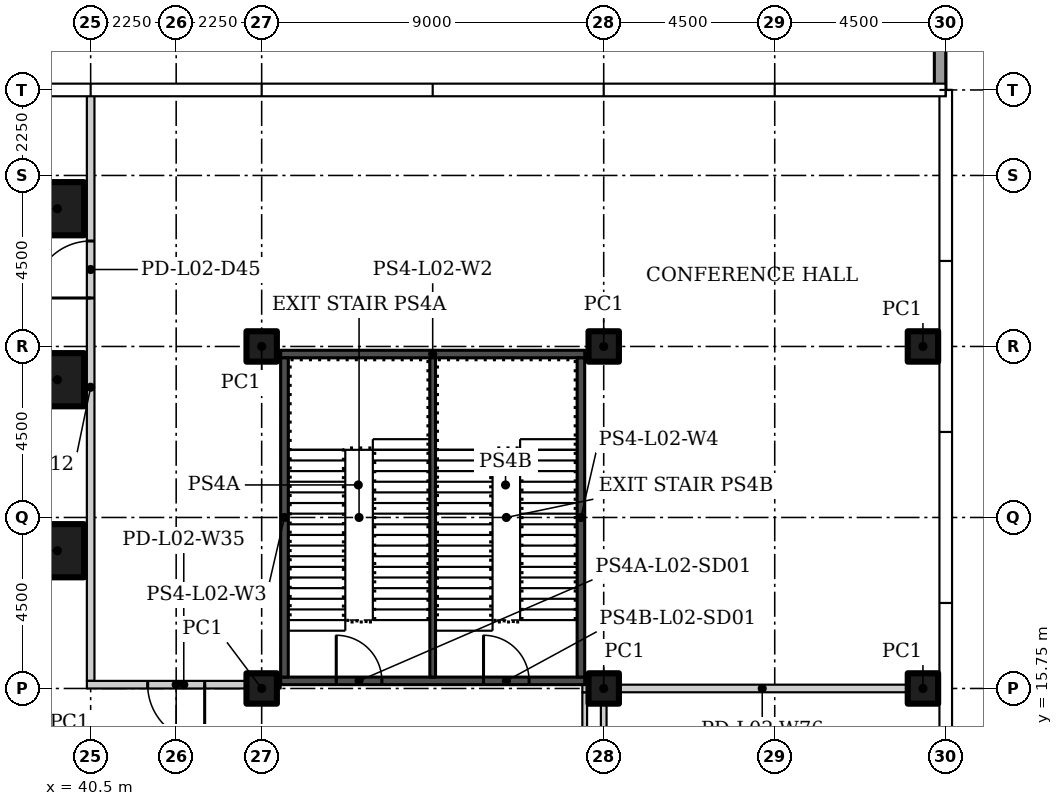
"""IFC4 building model, lengths in metres.
Left out: names, types, materials, properties, quantities, classifications, styles, units other than length and angle.
Written with IfcOpenShell. Run it as: python <this file> out.ifc"""

import sys

from ifc_helpers import new_model, si_unit, direction, frame, frame_2d, origin, origin_2d, place, context, subcontext, project, spatial, rectangle, hollow_rectangle, extrude, element, fill, save


model = new_model("IFC4")
c1 = context("Model", 3, precision=1e-05, world=origin(), true_north=direction((0.0, 1.0)))
c2 = subcontext(c1, "Body", "Model", "MODEL_VIEW")
j1 = project(units=[si_unit("LENGTHUNIT", "METRE"), si_unit("PLANEANGLEUNIT", "RADIAN")], contexts=[c1])
p1 = place(None, origin())
s1 = spatial("IfcSite", under=j1, at=p1, CompositionType="ELEMENT")
p2 = place(p1, origin())
s2 = spatial("IfcBuilding", under=s1, at=p2, CompositionType="ELEMENT")
p3 = place(p2, frame((0.0, 0.0, 12.5)))
s3 = spatial("IfcBuildingStorey", under=s2, at=p3, CompositionType="ELEMENT", Elevation=12.5)
for number, where in (
    (1, (39.625, 19.375, 0.0)),
    (2, (39.625, 23.875, 0.0)),
    (3, (39.625, 28.375, 0.0)),
):
    element("IfcColumn", number, at=place(p3, frame(where)), inside=s3, PredefinedType="COLUMN", context=c2, shape_type="SweptSolid", body=[
        extrude(hollow_rectangle(XDim=1.4, YDim=1.4, WallThickness=0.06, at=origin_2d()), origin(), (0.0, 0.0, 1.0), 5.6),
    ])
for number, where in (
    (4, (45.0, 15.75, 0.0)),
    (5, (45.0, 24.75, 0.0)),
    (6, (54.0, 15.75, 0.0)),
    (7, (54.0, 24.75, 0.0)),
    (8, (62.4, 15.75, 0.0)),
    (9, (62.4, 24.75, 0.0)),
):
    element("IfcColumn", number, at=place(p3, frame(where)), inside=s3, PredefinedType="COLUMN", context=c2, shape_type="SweptSolid", body=[
        extrude(hollow_rectangle(XDim=0.8, YDim=0.8, WallThickness=0.03, at=origin_2d()), origin(), (0.0, 0.0, 1.0), 5.6),
    ])
p4 = place(p3, frame((40.5, 15.95, 0.0), z_axis=(0.0, 0.0, 1.0), x_axis=(0.0, 1.0, 0.0)))
e10 = element("IfcWall", 10, at=p4, inside=s3, PredefinedType="PARTITIONING", context=c2, shape_type="SweptSolid", body=[
    extrude(rectangle(XDim=15.455, YDim=0.2, at=frame_2d((7.728, 0.0))), origin(), (0.0, 0.0, 1.0), 5.6),
])
p5 = place(p4, frame((10.075, 0.0, 0.0)))
e11 = element("IfcOpeningElement", 11, at=p5, cuts=e10, PredefinedType="OPENING", context=c2, shape_type="SweptSolid", body=[
    extrude(rectangle(XDim=1.5, YDim=2.1, at=frame_2d((0.75, 1.05))), frame((0.0, 0.11, 0.0), z_axis=(0.0, -1.0, 0.0), x_axis=(1.0, 0.0, 0.0)), (0.0, 0.0, 1.0), 0.22),
])
p6 = place(p3, frame((45.5, 15.85, 0.0), z_axis=(0.0, 0.0, 1.0), x_axis=(-1.0, 0.0, 0.0)))
e12 = element("IfcWall", 12, at=p6, inside=s3, PredefinedType="PARTITIONING", context=c2, shape_type="SweptSolid", body=[
    extrude(rectangle(XDim=5.1, YDim=0.2, at=frame_2d((2.55, 0.0))), origin(), (0.0, 0.0, 1.0), 5.6),
])
p7 = place(p6, frame((2.0, 0.0, 0.0)))
e13 = element("IfcOpeningElement", 13, at=p7, cuts=e12, PredefinedType="OPENING", context=c2, shape_type="SweptSolid", body=[
    extrude(rectangle(XDim=1.5, YDim=2.1, at=frame_2d((0.75, 1.05))), frame((0.0, 0.11, 0.0), z_axis=(0.0, -1.0, 0.0), x_axis=(1.0, 0.0, 0.0)), (0.0, 0.0, 1.0), 0.22),
])
p8 = place(p3, frame((53.5, 15.65, 0.0), z_axis=(0.0, 0.0, 1.0), x_axis=(0.0, -1.0, 0.0)))
e14 = element("IfcWall", 14, at=p8, inside=s3, PredefinedType="PARTITIONING", context=c2, shape_type="SweptSolid", body=[
    extrude(rectangle(XDim=2.738, YDim=0.125, at=frame_2d((1.369, 0.0))), origin(), (0.0, 0.0, 1.0), 5.6),
])
p9 = place(p3, frame((53.438, 15.75, 0.0)))
e15 = element("IfcWall", 15, at=p9, inside=s3, PredefinedType="PARTITIONING", context=c2, shape_type="SweptSolid", body=[
    extrude(rectangle(XDim=9.468, YDim=0.2, at=frame_2d((4.734, 0.0))), origin(), (0.0, 0.0, 1.0), 5.6),
])
p10 = place(p3, frame((54.0, 15.65, 0.0), z_axis=(0.0, 0.0, 1.0), x_axis=(0.0, -1.0, 0.0)))
e16 = element("IfcWall", 16, at=p10, inside=s3, PredefinedType="PARTITIONING", context=c2, shape_type="SweptSolid", body=[
    extrude(rectangle(XDim=8.825, YDim=0.15, at=frame_2d((4.413, 0.0))), origin(), (0.0, 0.0, 1.0), 5.6),
])
p11 = place(p3, frame((62.85, 31.5, 0.0), z_axis=(0.0, 0.0, 1.0), x_axis=(0.0, 1.0, 0.0)))
e17 = element("IfcWall", 17, at=p11, inside=s3, PredefinedType="PARAPET", context=c2, shape_type="SweptSolid", body=[
    extrude(rectangle(XDim=2.25, YDim=0.3, at=frame_2d((1.125, 0.0))), origin(), (0.0, 0.0, 1.0), 1.1),
])
p12 = place(p3, frame((45.5, 15.95, 0.0)))
e18 = element("IfcWall", 18, at=p12, inside=s3, PredefinedType="SHEAR", context=c2, shape_type="SweptSolid", body=[
    extrude(rectangle(XDim=8.0, YDim=0.2, at=frame_2d((4.0, 0.0))), origin(), (0.0, 0.0, 1.0), 5.6),
])
p13 = place(p12, frame((1.462, 0.0, 0.0)))
e19 = element("IfcOpeningElement", 19, at=p13, cuts=e18, PredefinedType="OPENING", context=c2, shape_type="SweptSolid", body=[
    extrude(rectangle(XDim=1.2, YDim=2.4, at=frame_2d((0.6, 1.2))), frame((0.0, 0.11, 0.0), z_axis=(0.0, -1.0, 0.0), x_axis=(1.0, 0.0, 0.0)), (0.0, 0.0, 1.0), 0.22),
])
p14 = place(p12, frame((5.337, 0.0, 0.0)))
e20 = element("IfcOpeningElement", 20, at=p14, cuts=e18, PredefinedType="OPENING", context=c2, shape_type="SweptSolid", body=[
    extrude(rectangle(XDim=1.2, YDim=2.4, at=frame_2d((0.6, 1.2))), frame((0.0, 0.11, 0.0), z_axis=(0.0, -1.0, 0.0), x_axis=(1.0, 0.0, 0.0)), (0.0, 0.0, 1.0), 0.22),
])
p15 = place(p3, frame((45.5, 24.55, 0.0)))
e21 = element("IfcWall", 21, at=p15, inside=s3, PredefinedType="SHEAR", context=c2, shape_type="SweptSolid", body=[
    extrude(rectangle(XDim=8.0, YDim=0.2, at=frame_2d((4.0, 0.0))), origin(), (0.0, 0.0, 1.0), 5.6),
])
for number, where, z_axis, x_axis in (
    (22, (45.6, 16.05, 0.0), (0.0, 0.0, 1.0), (0.0, 1.0, 0.0)),
    (23, (53.4, 16.05, 0.0), (0.0, 0.0, 1.0), (0.0, 1.0, 0.0)),
):
    element("IfcWall", number, at=place(p3, frame(where, z_axis=z_axis, x_axis=x_axis)), inside=s3, PredefinedType="SHEAR", context=c2, shape_type="SweptSolid", body=[
        extrude(rectangle(XDim=8.4, YDim=0.2, at=frame_2d((4.2, 0.0))), origin(), (0.0, 0.0, 1.0), 5.6),
    ])
p16 = place(p3, frame((49.5, 16.05, 0.0), z_axis=(0.0, 0.0, 1.0), x_axis=(0.0, 1.0, 0.0)))
e24 = element("IfcWall", 24, at=p16, inside=s3, PredefinedType="SHEAR", context=c2, shape_type="SweptSolid", body=[
    extrude(rectangle(XDim=8.4, YDim=0.15, at=frame_2d((4.2, 0.0))), origin(), (0.0, 0.0, 1.0), 5.6),
])
p17 = place(p5, origin())
e25 = element("IfcDoor", 25, at=p17, inside=s3, OperationType="DOUBLE_DOOR_SINGLE_SWING", PredefinedType="DOOR", context=c2, shape_type="SweptSolid", body=[
    extrude(rectangle(XDim=1.5, YDim=2.1, at=frame_2d((0.75, 1.05))), frame((0.0, 0.025, 0.0), z_axis=(0.0, -1.0, 0.0), x_axis=(1.0, 0.0, 0.0)), (0.0, 0.0, 1.0), 0.05),
])
fill(e11, e25)
p18 = place(p7, origin())
e26 = element("IfcDoor", 26, at=p18, inside=s3, OperationType="DOUBLE_DOOR_SINGLE_SWING", PredefinedType="DOOR", context=c2, shape_type="SweptSolid", body=[
    extrude(rectangle(XDim=1.5, YDim=2.1, at=frame_2d((0.75, 1.05))), frame((0.0, 0.025, 0.0), z_axis=(0.0, -1.0, 0.0), x_axis=(1.0, 0.0, 0.0)), (0.0, 0.0, 1.0), 0.05),
])
fill(e13, e26)
p19 = place(p13, origin())
e27 = element("IfcDoor", 27, at=p19, inside=s3, OperationType="SINGLE_SWING_LEFT", PredefinedType="DOOR", context=c2, shape_type="SweptSolid", body=[
    extrude(rectangle(XDim=1.2, YDim=2.4, at=frame_2d((0.6, 1.2))), frame((0.0, 0.025, 0.0), z_axis=(0.0, -1.0, 0.0), x_axis=(1.0, 0.0, 0.0)), (0.0, 0.0, 1.0), 0.05),
])
fill(e19, e27)
p20 = place(p14, origin())
e28 = element("IfcDoor", 28, at=p20, inside=s3, OperationType="SINGLE_SWING_RIGHT", PredefinedType="DOOR", context=c2, shape_type="SweptSolid", body=[
    extrude(rectangle(XDim=1.2, YDim=2.4, at=frame_2d((0.6, 1.2))), frame((0.0, 0.025, 0.0), z_axis=(0.0, -1.0, 0.0), x_axis=(1.0, 0.0, 0.0)), (0.0, 0.0, 1.0), 0.05),
])
fill(e20, e28)
save(model, sys.argv[1])
